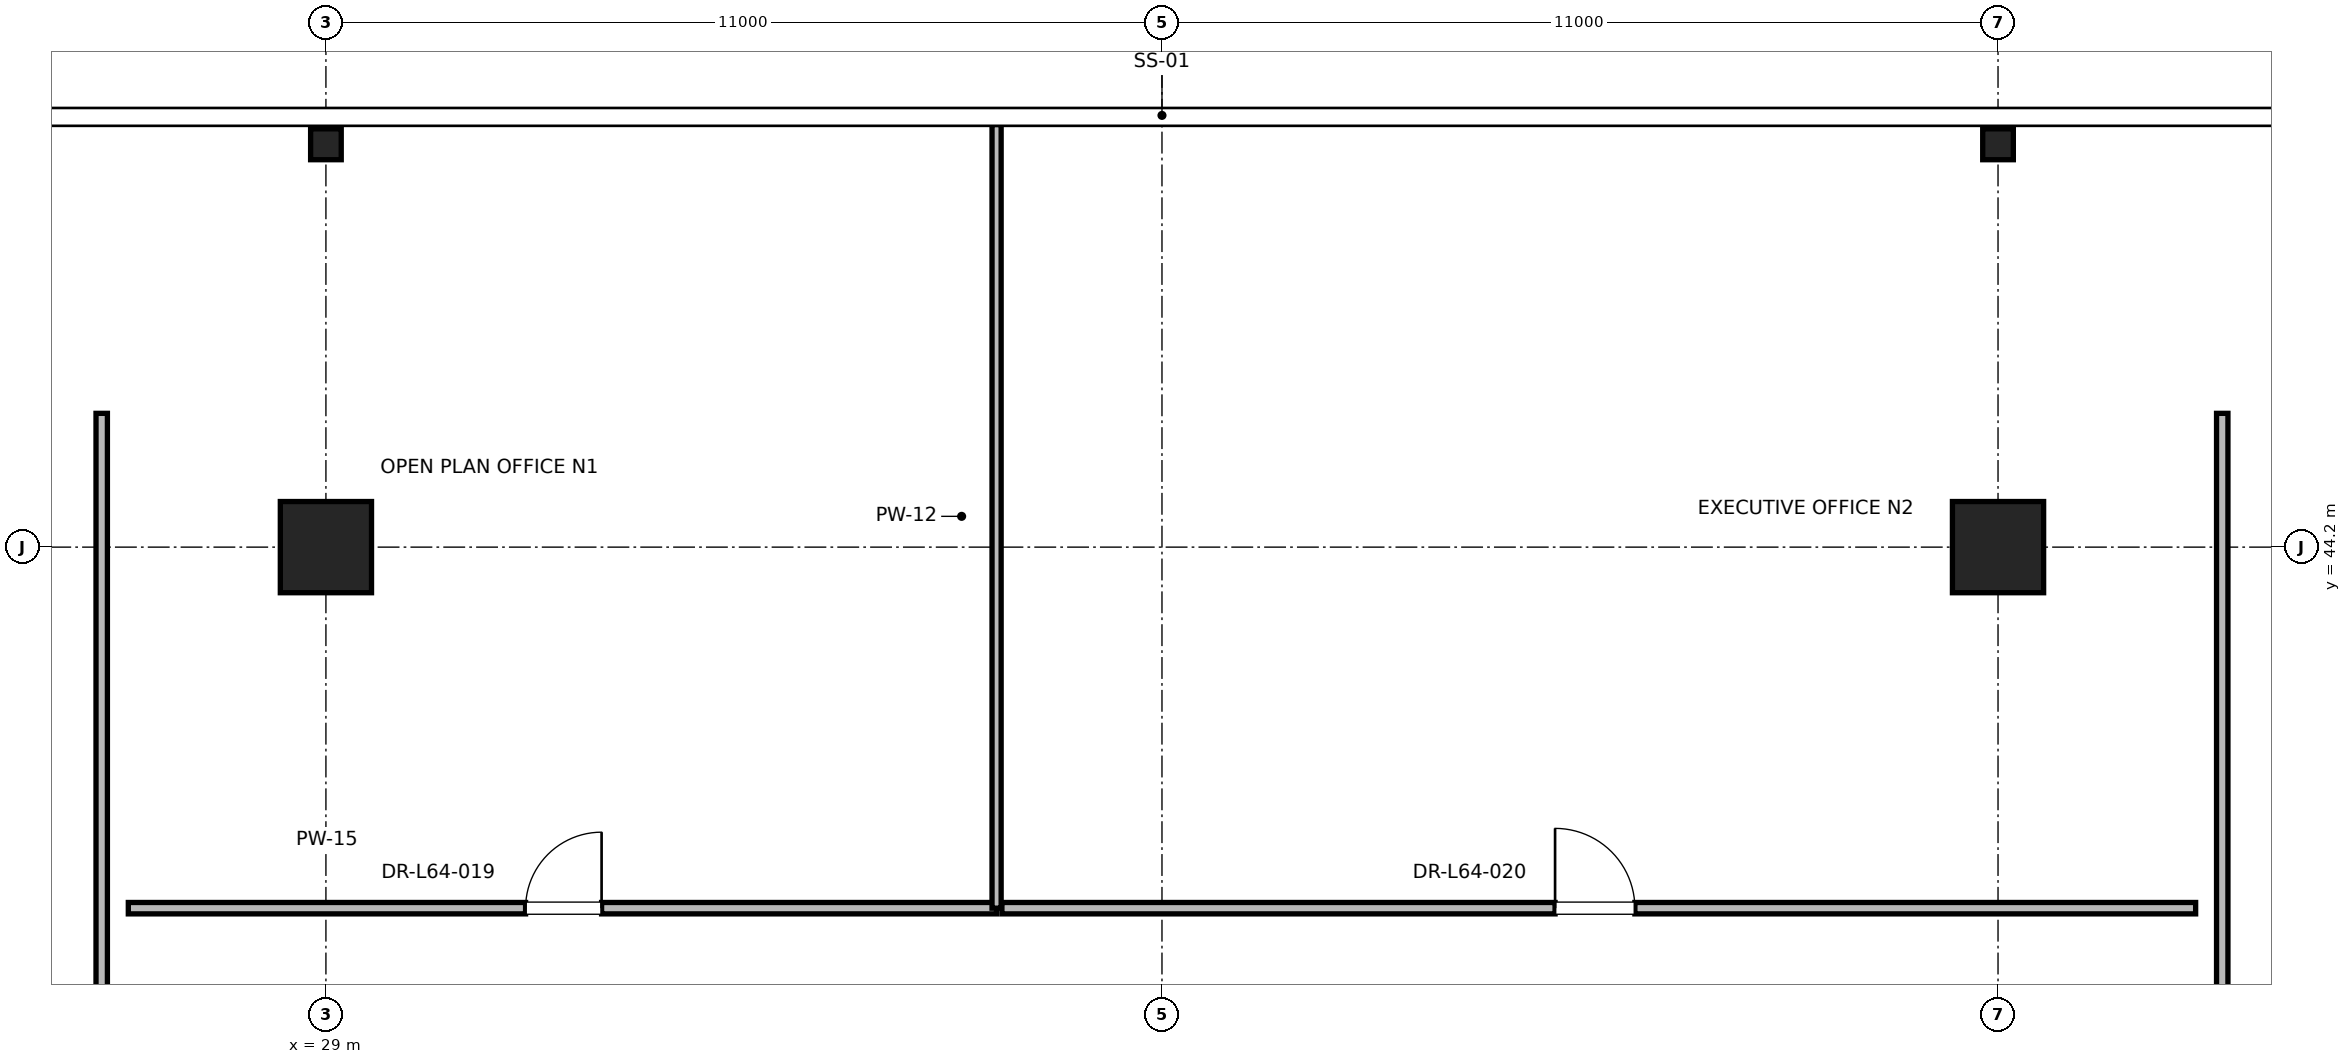
"""IFC4 building model, lengths in metres.
Left out: names, types, materials, properties, quantities, classifications, styles, units other than length and angle.
Written with IfcOpenShell. Run it as: python <this file> out.ifc"""

import sys

from ifc_helpers import new_model, si_unit, direction, frame, frame_2d, origin, origin_2d, place, context, subcontext, project, spatial, rectangle, i_section, extrude, element, fill, save


model = new_model("IFC4")
c1 = context("Model", 3, precision=1e-05, world=origin(), true_north=direction((0.0, 1.0)))
c2 = subcontext(c1, "Body", "Model", "MODEL_VIEW")
j1 = project(units=[si_unit("LENGTHUNIT", "METRE"), si_unit("PLANEANGLEUNIT", "RADIAN")], contexts=[c1])
p1 = place(None, origin())
s1 = spatial("IfcSite", under=j1, at=p1, CompositionType="ELEMENT")
p2 = place(p1, origin())
s2 = spatial("IfcBuilding", under=s1, at=p2, CompositionType="ELEMENT")
p3 = place(p2, frame((0.0, 0.0, 275.2)))
s3 = spatial("IfcBuildingStorey", under=s2, at=p3, CompositionType="ELEMENT", Elevation=275.2)
for number, where, z_axis, x_axis in (
    (1, (29.0, 44.2, 0.0), (0.0, 0.0, 1.0), (1.0, 0.0, 0.0)),
    (2, (51.0, 44.2, 0.0), (0.0, 0.0, 1.0), (1.0, 0.0, 0.0)),
):
    element("IfcColumn", number, at=place(p3, frame(where, z_axis=z_axis, x_axis=x_axis)), inside=s3, PredefinedType="COLUMN", context=c2, shape_type="SweptSolid", body=[
        extrude(rectangle(XDim=1.2, YDim=1.2, at=origin_2d()), origin(), (0.0, 0.0, 1.0), 4.0),
    ])
for number, where, z_axis, x_axis in (
    (3, (29.0, 49.5, 0.0), (0.0, 0.0, 1.0), (1.0, 0.0, 0.0)),
    (4, (51.0, 49.5, 0.0), (0.0, 0.0, 1.0), (1.0, 0.0, 0.0)),
):
    element("IfcColumn", number, at=place(p3, frame(where, z_axis=z_axis, x_axis=x_axis)), inside=s3, PredefinedType="COLUMN", context=c2, shape_type="SweptSolid", body=[
        extrude(i_section(OverallWidth=0.403, OverallDepth=0.406, WebThickness=0.027, FlangeThickness=0.043, FilletRadius=0.015, at=origin_2d()), origin(), (0.0, 0.0, 1.0), 4.0),
    ])
p4 = place(p3, frame((26.4, 39.45, 0.0), z_axis=(0.0, 0.0, 1.0), x_axis=(1.0, 0.0, 0.0)))
e5 = element("IfcWall", 5, at=p4, inside=s3, PredefinedType="PARTITIONING", context=c2, shape_type="SweptSolid", body=[
    extrude(rectangle(XDim=11.424, YDim=0.15, at=frame_2d((5.712, 0.0))), origin(), (0.0, 0.0, 1.0), 2.85),
])
p5 = place(p4, frame((5.227, 0.0, 0.0)))
e6 = element("IfcOpeningElement", 6, at=p5, cuts=e5, PredefinedType="OPENING", context=c2, shape_type="SweptSolid", body=[
    extrude(rectangle(XDim=1.0, YDim=2.15, at=frame_2d((0.5, 1.075))), frame((0.0, 0.075, 0.0), z_axis=(0.0, -1.0, 0.0), x_axis=(1.0, 0.0, 0.0)), (0.0, 0.0, 1.0), 0.15),
])
p6 = place(p3, frame((37.824, 39.45, 0.0), z_axis=(0.0, 0.0, 1.0), x_axis=(0.0, 1.0, 0.0)))
e7 = element("IfcWall", 7, at=p6, inside=s3, PredefinedType="PARTITIONING", context=c2, shape_type="SweptSolid", body=[
    extrude(rectangle(XDim=10.31, YDim=0.12, at=frame_2d((5.155, 0.0))), origin(), (0.0, 0.0, 1.0), 2.415),
])
p7 = place(p3, frame((37.894, 39.45, 0.0), z_axis=(0.0, 0.0, 1.0), x_axis=(1.0, 0.0, 0.0)))
e8 = element("IfcWall", 8, at=p7, inside=s3, PredefinedType="PARTITIONING", context=c2, shape_type="SweptSolid", body=[
    extrude(rectangle(XDim=15.706, YDim=0.15, at=frame_2d((7.853, 0.0))), origin(), (0.0, 0.0, 1.0), 2.85),
])
p8 = place(p7, frame((7.278, 0.0, 0.0)))
e9 = element("IfcOpeningElement", 9, at=p8, cuts=e8, PredefinedType="OPENING", context=c2, shape_type="SweptSolid", body=[
    extrude(rectangle(XDim=1.05, YDim=2.2, at=frame_2d((0.525, 1.1))), frame((0.0, 0.075, 0.0), z_axis=(0.0, -1.0, 0.0), x_axis=(1.0, 0.0, 0.0)), (0.0, 0.0, 1.0), 0.15),
])
p9 = place(p3, frame((26.05, 33.477, 0.0), z_axis=(0.0, 0.0, 1.0), x_axis=(0.0, 1.0, 0.0)))
e10 = element("IfcWall", 10, at=p9, inside=s3, PredefinedType="PARTITIONING", context=c2, shape_type="SweptSolid", body=[
    extrude(rectangle(XDim=12.483, YDim=0.15, at=frame_2d((6.241, 0.0))), origin(), (0.0, 0.0, 1.0), 2.85),
])
p10 = place(p9, frame((0.961, 0.0, 0.0)))
e11 = element("IfcOpeningElement", 11, at=p10, cuts=e10, PredefinedType="OPENING", context=c2, shape_type="SweptSolid", body=[
    extrude(rectangle(XDim=1.0, YDim=2.15, at=frame_2d((0.5, 1.075))), frame((0.0, 0.075, 0.0), z_axis=(0.0, -1.0, 0.0), x_axis=(1.0, 0.0, 0.0)), (0.0, 0.0, 1.0), 0.15),
])
p11 = place(p3, frame((53.95, 34.954, 0.0), z_axis=(0.0, 0.0, 1.0), x_axis=(0.0, 1.0, 0.0)))
e12 = element("IfcWall", 12, at=p11, inside=s3, PredefinedType="PARTITIONING", context=c2, shape_type="SweptSolid", body=[
    extrude(rectangle(XDim=11.006, YDim=0.15, at=frame_2d((5.503, 0.0))), origin(), (0.0, 0.0, 1.0), 2.85),
])
p12 = place(p11, frame((0.14, 0.0, 0.0)))
e13 = element("IfcOpeningElement", 13, at=p12, cuts=e12, PredefinedType="OPENING", context=c2, shape_type="SweptSolid", body=[
    extrude(rectangle(XDim=1.5, YDim=2.25, at=frame_2d((0.75, 1.125))), frame((0.0, 0.075, 0.0), z_axis=(0.0, -1.0, 0.0), x_axis=(1.0, 0.0, 0.0)), (0.0, 0.0, 1.0), 0.15),
])
p13 = place(p5, origin())
e14 = element("IfcDoor", 14, at=p13, inside=s3, OperationType="SINGLE_SWING_RIGHT", PredefinedType="DOOR", context=c2, shape_type="SweptSolid", body=[
    extrude(rectangle(XDim=1.0, YDim=2.15, at=frame_2d((0.5, 1.075))), frame((0.0, 0.025, 0.0), z_axis=(0.0, -1.0, 0.0), x_axis=(1.0, 0.0, 0.0)), (0.0, 0.0, 1.0), 0.05),
])
fill(e6, e14)
p14 = place(p8, origin())
e15 = element("IfcDoor", 15, at=p14, inside=s3, OperationType="SINGLE_SWING_LEFT", PredefinedType="DOOR", context=c2, shape_type="SweptSolid", body=[
    extrude(rectangle(XDim=1.05, YDim=2.2, at=frame_2d((0.525, 1.1))), frame((0.0, 0.025, 0.0), z_axis=(0.0, -1.0, 0.0), x_axis=(1.0, 0.0, 0.0)), (0.0, 0.0, 1.0), 0.05),
])
fill(e9, e15)
save(model, sys.argv[1])
